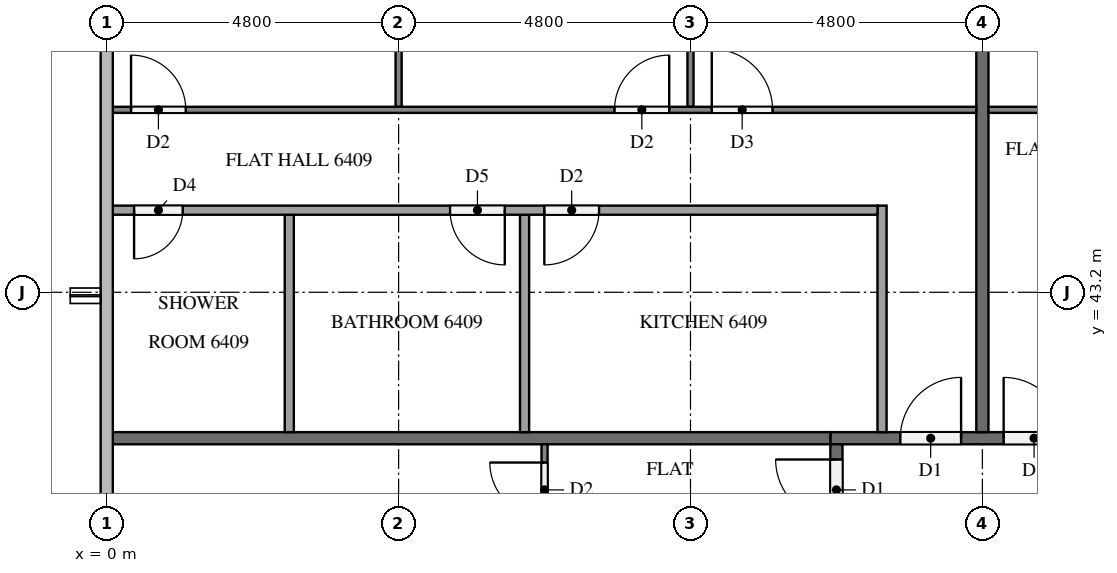
"""IFC4 building model, lengths in metres.
Left out: names, types, materials, properties, quantities, classifications, styles, units other than length and angle.
Written with IfcOpenShell. Run it as: python <this file> out.ifc"""

import sys

from ifc_helpers import new_model, si_unit, direction, frame, frame_2d, origin, place, context, subcontext, project, spatial, rectangle, extrude, element, fill, save


model = new_model("IFC4")
c1 = context("Model", 3, precision=1e-05, world=origin(), true_north=direction((0.0, 1.0)))
c2 = subcontext(c1, "Body", "Model", "MODEL_VIEW")
j1 = project(units=[si_unit("LENGTHUNIT", "METRE"), si_unit("PLANEANGLEUNIT", "RADIAN")], contexts=[c1])
p1 = place(None, origin())
s1 = spatial("IfcSite", under=j1, at=p1, CompositionType="ELEMENT")
p2 = place(p1, origin())
s2 = spatial("IfcBuilding", under=s1, at=p2, CompositionType="ELEMENT")
p3 = place(p2, frame((0.0, 0.0, 245.7)))
s3 = spatial("IfcBuildingStorey", under=s2, at=p3, CompositionType="ELEMENT", Elevation=245.7)
p4 = place(p3, frame((11.9, 40.8, 0.0), z_axis=(0.0, 0.0, 1.0), x_axis=(1.0, 0.0, 0.0)))
e1 = element("IfcWall", 1, at=p4, inside=s3, PredefinedType="PARTITIONING", context=c2, shape_type="SweptSolid", body=[
    extrude(rectangle(XDim=38.6, YDim=0.2, at=frame_2d((19.3, 0.0))), origin(), (0.0, 0.0, 1.0), 3.2),
])
p5 = place(p4, frame((34.05, 0.0, 0.0)))
e2 = element("IfcOpeningElement", 2, at=p5, cuts=e1, PredefinedType="OPENING", context=c2, shape_type="SweptSolid", body=[
    extrude(rectangle(XDim=1.0, YDim=2.1, at=frame_2d((0.5, 1.05))), frame((0.0, 0.11, 0.0), z_axis=(0.0, -1.0, 0.0), x_axis=(1.0, 0.0, 0.0)), (0.0, 0.0, 1.0), 0.22),
])
p6 = place(p4, frame((32.3, 0.0, 0.0)))
e3 = element("IfcOpeningElement", 3, at=p6, cuts=e1, PredefinedType="OPENING", context=c2, shape_type="SweptSolid", body=[
    extrude(rectangle(XDim=1.1, YDim=2.1, at=frame_2d((0.55, 1.05))), frame((0.0, 0.11, 0.0), z_axis=(0.0, -1.0, 0.0), x_axis=(1.0, 0.0, 0.0)), (0.0, 0.0, 1.0), 0.22),
])
p7 = place(p4, frame((2.85, 0.0, 0.0)))
e4 = element("IfcOpeningElement", 4, at=p7, cuts=e1, PredefinedType="OPENING", context=c2, shape_type="SweptSolid", body=[
    extrude(rectangle(XDim=1.0, YDim=2.1, at=frame_2d((0.5, 1.05))), frame((0.0, 0.11, 0.0), z_axis=(0.0, -1.0, 0.0), x_axis=(1.0, 0.0, 0.0)), (0.0, 0.0, 1.0), 0.22),
])
p8 = place(p4, frame((1.15, 0.0, 0.0)))
e5 = element("IfcOpeningElement", 5, at=p8, cuts=e1, PredefinedType="OPENING", context=c2, shape_type="SweptSolid", body=[
    extrude(rectangle(XDim=1.0, YDim=2.1, at=frame_2d((0.5, 1.05))), frame((0.0, 0.11, 0.0), z_axis=(0.0, -1.0, 0.0), x_axis=(1.0, 0.0, 0.0)), (0.0, 0.0, 1.0), 0.22),
])
p9 = place(p3, frame((12.0, 12.1, 0.0), z_axis=(0.0, 0.0, 1.0), x_axis=(0.0, 1.0, 0.0)))
e6 = element("IfcWall", 6, at=p9, inside=s3, PredefinedType="PARTITIONING", context=c2, shape_type="SweptSolid", body=[
    extrude(rectangle(XDim=28.6, YDim=0.2, at=frame_2d((14.3, 0.0))), origin(), (0.0, 0.0, 1.0), 3.2),
])
p10 = place(p9, frame((27.35, 0.0, 0.0)))
e7 = element("IfcOpeningElement", 7, at=p10, cuts=e6, PredefinedType="OPENING", context=c2, shape_type="SweptSolid", body=[
    extrude(rectangle(XDim=1.0, YDim=2.1, at=frame_2d((0.5, 1.05))), frame((0.0, 0.11, 0.0), z_axis=(0.0, -1.0, 0.0), x_axis=(1.0, 0.0, 0.0)), (0.0, 0.0, 1.0), 0.22),
])
p11 = place(p9, frame((17.75, 0.0, 0.0)))
e8 = element("IfcOpeningElement", 8, at=p11, cuts=e6, PredefinedType="OPENING", context=c2, shape_type="SweptSolid", body=[
    extrude(rectangle(XDim=1.0, YDim=2.1, at=frame_2d((0.5, 1.05))), frame((0.0, 0.11, 0.0), z_axis=(0.0, -1.0, 0.0), x_axis=(1.0, 0.0, 0.0)), (0.0, 0.0, 1.0), 0.22),
])
p12 = place(p9, frame((3.35, 0.0, 0.0)))
e9 = element("IfcOpeningElement", 9, at=p12, cuts=e6, PredefinedType="OPENING", context=c2, shape_type="SweptSolid", body=[
    extrude(rectangle(XDim=1.0, YDim=2.1, at=frame_2d((0.5, 1.05))), frame((0.0, 0.11, 0.0), z_axis=(0.0, -1.0, 0.0), x_axis=(1.0, 0.0, 0.0)), (0.0, 0.0, 1.0), 0.22),
])
p13 = place(p3, frame((14.4, 52.525, 0.0), z_axis=(0.0, 0.0, 1.0), x_axis=(0.0, -1.0, 0.0)))
e10 = element("IfcWall", 10, at=p13, inside=s3, PredefinedType="PARTITIONING", context=c2, shape_type="SweptSolid", body=[
    extrude(rectangle(XDim=11.625, YDim=0.2, at=frame_2d((5.812, 0.0))), origin(), (0.0, 0.0, 1.0), 3.2),
])
p14 = place(p3, frame((0.1, 40.8, 0.0), z_axis=(0.0, 0.0, 1.0), x_axis=(1.0, 0.0, 0.0)))
e11 = element("IfcWall", 11, at=p14, inside=s3, PredefinedType="PARTITIONING", context=c2, shape_type="SweptSolid", body=[
    extrude(rectangle(XDim=11.8, YDim=0.2, at=frame_2d((5.9, 0.0))), origin(), (0.0, 0.0, 1.0), 3.2),
])
p15 = place(p3, frame((14.5, 46.2, 0.0), z_axis=(0.0, 0.0, 1.0), x_axis=(1.0, 0.0, 0.0)))
e12 = element("IfcWall", 12, at=p15, inside=s3, PredefinedType="PARTITIONING", context=c2, shape_type="SweptSolid", body=[
    extrude(rectangle(XDim=11.8, YDim=0.1, at=frame_2d((5.9, 0.0))), origin(), (0.0, 0.0, 1.0), 3.2),
])
p16 = place(p15, frame((3.45, 0.0, 0.0)))
e13 = element("IfcOpeningElement", 13, at=p16, cuts=e12, PredefinedType="OPENING", context=c2, shape_type="SweptSolid", body=[
    extrude(rectangle(XDim=0.9, YDim=2.1, at=frame_2d((0.45, 1.05))), frame((0.0, 0.06, 0.0), z_axis=(0.0, -1.0, 0.0), x_axis=(1.0, 0.0, 0.0)), (0.0, 0.0, 1.0), 0.12),
])
p17 = place(p15, frame((5.05, 0.0, 0.0)))
e14 = element("IfcOpeningElement", 14, at=p17, cuts=e12, PredefinedType="OPENING", context=c2, shape_type="SweptSolid", body=[
    extrude(rectangle(XDim=1.0, YDim=2.1, at=frame_2d((0.5, 1.05))), frame((0.0, 0.06, 0.0), z_axis=(0.0, -1.0, 0.0), x_axis=(1.0, 0.0, 0.0)), (0.0, 0.0, 1.0), 0.12),
])
p18 = place(p3, frame((9.6, 46.25, 0.0), z_axis=(0.0, 0.0, 1.0), x_axis=(0.0, 1.0, 0.0)))
e15 = element("IfcWall", 15, at=p18, inside=s3, PredefinedType="PARTITIONING", context=c2, shape_type="SweptSolid", body=[
    extrude(rectangle(XDim=6.45, YDim=0.1, at=frame_2d((3.225, 0.0))), origin(), (0.0, 0.0, 1.0), 3.2),
])
p19 = place(p3, frame((4.8, 46.25, 0.0), z_axis=(0.0, 0.0, 1.0), x_axis=(0.0, 1.0, 0.0)))
e16 = element("IfcWall", 16, at=p19, inside=s3, PredefinedType="PARTITIONING", context=c2, shape_type="SweptSolid", body=[
    extrude(rectangle(XDim=6.2, YDim=0.1, at=frame_2d((3.1, 0.0))), origin(), (0.0, 0.0, 1.0), 3.2),
])
p20 = place(p3, frame((0.1, 46.2, 0.0), z_axis=(0.0, 0.0, 1.0), x_axis=(1.0, 0.0, 0.0)))
e17 = element("IfcWall", 17, at=p20, inside=s3, PredefinedType="PARTITIONING", context=c2, shape_type="SweptSolid", body=[
    extrude(rectangle(XDim=14.2, YDim=0.1, at=frame_2d((7.1, 0.0))), origin(), (0.0, 0.0, 1.0), 3.2),
])
p21 = place(p20, frame((9.85, 0.0, 0.0)))
e18 = element("IfcOpeningElement", 18, at=p21, cuts=e17, PredefinedType="OPENING", context=c2, shape_type="SweptSolid", body=[
    extrude(rectangle(XDim=1.0, YDim=2.1, at=frame_2d((0.5, 1.05))), frame((0.0, 0.06, 0.0), z_axis=(0.0, -1.0, 0.0), x_axis=(1.0, 0.0, 0.0)), (0.0, 0.0, 1.0), 0.12),
])
p22 = place(p20, frame((8.25, 0.0, 0.0)))
e19 = element("IfcOpeningElement", 19, at=p22, cuts=e17, PredefinedType="OPENING", context=c2, shape_type="SweptSolid", body=[
    extrude(rectangle(XDim=0.9, YDim=2.1, at=frame_2d((0.45, 1.05))), frame((0.0, 0.06, 0.0), z_axis=(0.0, -1.0, 0.0), x_axis=(1.0, 0.0, 0.0)), (0.0, 0.0, 1.0), 0.12),
])
p23 = place(p20, frame((0.3, 0.0, 0.0)))
e20 = element("IfcOpeningElement", 20, at=p23, cuts=e17, PredefinedType="OPENING", context=c2, shape_type="SweptSolid", body=[
    extrude(rectangle(XDim=0.9, YDim=2.1, at=frame_2d((0.45, 1.05))), frame((0.0, 0.06, 0.0), z_axis=(0.0, -1.0, 0.0), x_axis=(1.0, 0.0, 0.0)), (0.0, 0.0, 1.0), 0.12),
])
for number, where, z_axis, x_axis in (
    (21, (6.871, 40.9, 0.0), (0.0, 0.0, 1.0), (0.0, 1.0, 0.0)),
    (22, (3.002, 40.9, 0.0), (0.0, 0.0, 1.0), (0.0, 1.0, 0.0)),
):
    element("IfcWall", number, at=place(p3, frame(where, z_axis=z_axis, x_axis=x_axis)), inside=s3, PredefinedType="PARTITIONING", context=c2, shape_type="SweptSolid", body=[
        extrude(rectangle(XDim=3.575, YDim=0.15, at=frame_2d((1.788, 0.0))), origin(), (0.0, 0.0, 1.0), 3.2),
    ])
p24 = place(p3, frame((12.75, 40.9, 0.0), z_axis=(0.0, 0.0, 1.0), x_axis=(0.0, 1.0, 0.0)))
e23 = element("IfcWall", 23, at=p24, inside=s3, PredefinedType="PARTITIONING", context=c2, shape_type="SweptSolid", body=[
    extrude(rectangle(XDim=3.725, YDim=0.15, at=frame_2d((1.863, 0.0))), origin(), (0.0, 0.0, 1.0), 3.2),
])
p25 = place(p3, frame((12.675, 44.55, 0.0), z_axis=(0.0, 0.0, 1.0), x_axis=(-1.0, 0.0, 0.0)))
e24 = element("IfcWall", 24, at=p25, inside=s3, PredefinedType="PARTITIONING", context=c2, shape_type="SweptSolid", body=[
    extrude(rectangle(XDim=12.575, YDim=0.15, at=frame_2d((6.288, 0.0))), origin(), (0.0, 0.0, 1.0), 3.2),
])
p26 = place(p25, frame((4.579, 0.0, 0.0)))
e25 = element("IfcOpeningElement", 25, at=p26, cuts=e24, PredefinedType="OPENING", context=c2, shape_type="SweptSolid", body=[
    extrude(rectangle(XDim=0.9, YDim=2.1, at=frame_2d((0.45, 1.05))), frame((0.0, 0.085, 0.0), z_axis=(0.0, -1.0, 0.0), x_axis=(1.0, 0.0, 0.0)), (0.0, 0.0, 1.0), 0.17),
])
p27 = place(p25, frame((6.129, 0.0, 0.0)))
e26 = element("IfcOpeningElement", 26, at=p27, cuts=e24, PredefinedType="OPENING", context=c2, shape_type="SweptSolid", body=[
    extrude(rectangle(XDim=0.9, YDim=2.1, at=frame_2d((0.45, 1.05))), frame((0.0, 0.085, 0.0), z_axis=(0.0, -1.0, 0.0), x_axis=(1.0, 0.0, 0.0)), (0.0, 0.0, 1.0), 0.17),
])
p28 = place(p25, frame((11.425, 0.0, 0.0)))
e27 = element("IfcOpeningElement", 27, at=p28, cuts=e24, PredefinedType="OPENING", context=c2, shape_type="SweptSolid", body=[
    extrude(rectangle(XDim=0.8, YDim=2.1, at=frame_2d((0.4, 1.05))), frame((0.0, 0.085, 0.0), z_axis=(0.0, -1.0, 0.0), x_axis=(1.0, 0.0, 0.0)), (0.0, 0.0, 1.0), 0.17),
])
p29 = place(p3, frame((7.2, 31.3, 0.0), z_axis=(0.0, 0.0, 1.0), x_axis=(0.0, 1.0, 0.0)))
e28 = element("IfcWall", 28, at=p29, inside=s3, PredefinedType="PARTITIONING", context=c2, shape_type="SweptSolid", body=[
    extrude(rectangle(XDim=9.4, YDim=0.1, at=frame_2d((4.7, 0.0))), origin(), (0.0, 0.0, 1.0), 3.2),
])
p30 = place(p29, frame((8.2, 0.0, 0.0)))
e29 = element("IfcOpeningElement", 29, at=p30, cuts=e28, PredefinedType="OPENING", context=c2, shape_type="SweptSolid", body=[
    extrude(rectangle(XDim=0.9, YDim=2.1, at=frame_2d((0.45, 1.05))), frame((0.0, 0.06, 0.0), z_axis=(0.0, -1.0, 0.0), x_axis=(1.0, 0.0, 0.0)), (0.0, 0.0, 1.0), 0.12),
])
p31 = place(p29, frame((0.3, 0.0, 0.0)))
e30 = element("IfcOpeningElement", 30, at=p31, cuts=e28, PredefinedType="OPENING", context=c2, shape_type="SweptSolid", body=[
    extrude(rectangle(XDim=1.0, YDim=2.1, at=frame_2d((0.5, 1.05))), frame((0.0, 0.06, 0.0), z_axis=(0.0, -1.0, 0.0), x_axis=(1.0, 0.0, 0.0)), (0.0, 0.0, 1.0), 0.12),
])
p32 = place(p7, origin())
e31 = element("IfcDoor", 31, at=p32, inside=s3, OperationType="SINGLE_SWING_LEFT", PredefinedType="DOOR", context=c2, shape_type="SweptSolid", body=[
    extrude(rectangle(XDim=1.0, YDim=2.1, at=frame_2d((0.5, 1.05))), frame((0.0, 0.025, 0.0), z_axis=(0.0, -1.0, 0.0), x_axis=(1.0, 0.0, 0.0)), (0.0, 0.0, 1.0), 0.05),
])
fill(e4, e31)
p33 = place(p8, origin())
e32 = element("IfcDoor", 32, at=p33, inside=s3, OperationType="SINGLE_SWING_RIGHT", PredefinedType="DOOR", context=c2, shape_type="SweptSolid", body=[
    extrude(rectangle(XDim=1.0, YDim=2.1, at=frame_2d((0.5, 1.05))), frame((0.0, 0.025, 0.0), z_axis=(0.0, -1.0, 0.0), x_axis=(1.0, 0.0, 0.0)), (0.0, 0.0, 1.0), 0.05),
])
fill(e5, e32)
p34 = place(p10, origin())
e33 = element("IfcDoor", 33, at=p34, inside=s3, OperationType="SINGLE_SWING_RIGHT", PredefinedType="DOOR", context=c2, shape_type="SweptSolid", body=[
    extrude(rectangle(XDim=1.0, YDim=2.1, at=frame_2d((0.5, 1.05))), frame((0.0, 0.025, 0.0), z_axis=(0.0, -1.0, 0.0), x_axis=(1.0, 0.0, 0.0)), (0.0, 0.0, 1.0), 0.05),
])
fill(e7, e33)
p35 = place(p21, origin())
e34 = element("IfcDoor", 34, at=p35, inside=s3, OperationType="SINGLE_SWING_LEFT", PredefinedType="DOOR", context=c2, shape_type="SweptSolid", body=[
    extrude(rectangle(XDim=1.0, YDim=2.1, at=frame_2d((0.5, 1.05))), frame((0.0, 0.025, 0.0), z_axis=(0.0, -1.0, 0.0), x_axis=(1.0, 0.0, 0.0)), (0.0, 0.0, 1.0), 0.05),
])
fill(e18, e34)
p36 = place(p22, origin())
e35 = element("IfcDoor", 35, at=p36, inside=s3, OperationType="SINGLE_SWING_RIGHT", PredefinedType="DOOR", context=c2, shape_type="SweptSolid", body=[
    extrude(rectangle(XDim=0.9, YDim=2.1, at=frame_2d((0.45, 1.05))), frame((0.0, 0.025, 0.0), z_axis=(0.0, -1.0, 0.0), x_axis=(1.0, 0.0, 0.0)), (0.0, 0.0, 1.0), 0.05),
])
fill(e19, e35)
p37 = place(p23, origin())
e36 = element("IfcDoor", 36, at=p37, inside=s3, OperationType="SINGLE_SWING_LEFT", PredefinedType="DOOR", context=c2, shape_type="SweptSolid", body=[
    extrude(rectangle(XDim=0.9, YDim=2.1, at=frame_2d((0.45, 1.05))), frame((0.0, 0.025, 0.0), z_axis=(0.0, -1.0, 0.0), x_axis=(1.0, 0.0, 0.0)), (0.0, 0.0, 1.0), 0.05),
])
fill(e20, e36)
p38 = place(p26, origin())
e37 = element("IfcDoor", 37, at=p38, inside=s3, OperationType="SINGLE_SWING_RIGHT", PredefinedType="DOOR", context=c2, shape_type="SweptSolid", body=[
    extrude(rectangle(XDim=0.9, YDim=2.1, at=frame_2d((0.45, 1.05))), frame((0.0, 0.025, 0.0), z_axis=(0.0, -1.0, 0.0), x_axis=(1.0, 0.0, 0.0)), (0.0, 0.0, 1.0), 0.05),
])
fill(e25, e37)
p39 = place(p27, origin())
e38 = element("IfcDoor", 38, at=p39, inside=s3, OperationType="SINGLE_SWING_LEFT", PredefinedType="DOOR", context=c2, shape_type="SweptSolid", body=[
    extrude(rectangle(XDim=0.9, YDim=2.1, at=frame_2d((0.45, 1.05))), frame((0.0, 0.025, 0.0), z_axis=(0.0, -1.0, 0.0), x_axis=(1.0, 0.0, 0.0)), (0.0, 0.0, 1.0), 0.05),
])
fill(e26, e38)
p40 = place(p28, origin())
e39 = element("IfcDoor", 39, at=p40, inside=s3, OperationType="SINGLE_SWING_RIGHT", PredefinedType="DOOR", context=c2, shape_type="SweptSolid", body=[
    extrude(rectangle(XDim=0.8, YDim=2.1, at=frame_2d((0.4, 1.05))), frame((0.0, 0.025, 0.0), z_axis=(0.0, -1.0, 0.0), x_axis=(1.0, 0.0, 0.0)), (0.0, 0.0, 1.0), 0.05),
])
fill(e27, e39)
p41 = place(p30, origin())
e40 = element("IfcDoor", 40, at=p41, inside=s3, OperationType="SINGLE_SWING_RIGHT", PredefinedType="DOOR", context=c2, shape_type="SweptSolid", body=[
    extrude(rectangle(XDim=0.9, YDim=2.1, at=frame_2d((0.45, 1.05))), frame((0.0, 0.025, 0.0), z_axis=(0.0, -1.0, 0.0), x_axis=(1.0, 0.0, 0.0)), (0.0, 0.0, 1.0), 0.05),
])
fill(e29, e40)
save(model, sys.argv[1])
